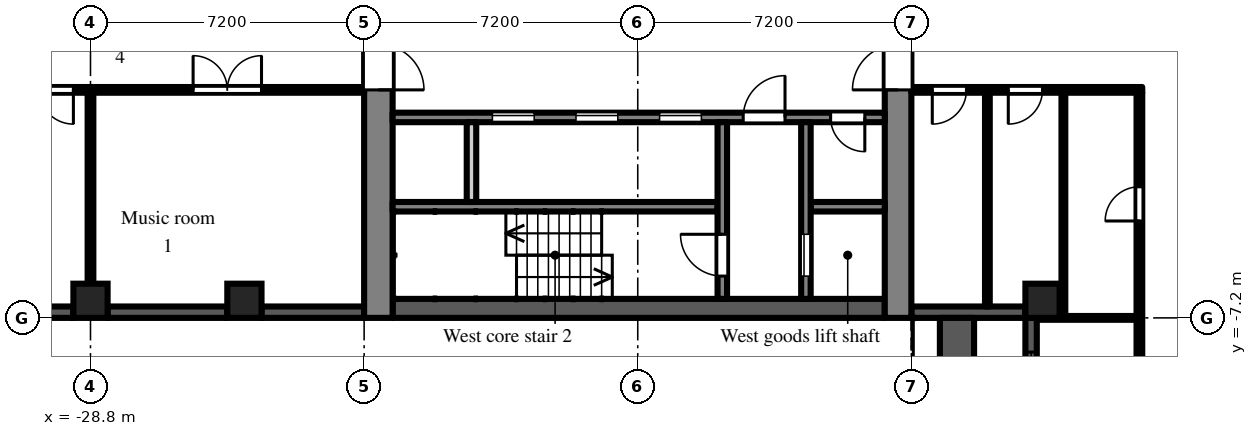
"""IFC4 building model, lengths in metres.
Left out: names, types, materials, properties, quantities, classifications, styles, units other than length and angle.
Written with IfcOpenShell. Run it as: python <this file> out.ifc"""

import sys

from ifc_helpers import new_model, si_unit, direction, frame, frame_2d, origin, origin_2d, place, context, subcontext, project, spatial, rectangle, extrude, element, fill, save


model = new_model("IFC4")
c1 = context("Model", 3, precision=1e-05, world=origin(), true_north=direction((0.0, 1.0)))
c2 = subcontext(c1, "Body", "Model", "MODEL_VIEW")
j1 = project(units=[si_unit("LENGTHUNIT", "METRE"), si_unit("PLANEANGLEUNIT", "RADIAN")], contexts=[c1])
p1 = place(None, origin())
s1 = spatial("IfcSite", under=j1, at=p1, CompositionType="ELEMENT")
p2 = place(p1, origin())
s2 = spatial("IfcBuilding", under=s1, at=p2, CompositionType="ELEMENT")
p3 = place(p2, frame((0.0, 0.0, 102.9)))
s3 = spatial("IfcBuildingStorey", under=s2, at=p3, CompositionType="ELEMENT", Elevation=102.9)
for number, where, z_axis, x_axis in (
    (1, (-28.8, -6.75, 0.0), (0.0, 0.0, 1.0), (1.0, 0.0, 0.0)),
    (2, (-24.75, -6.75, 0.0), (0.0, 0.0, 1.0), (1.0, 0.0, 0.0)),
    (3, (-3.75, -6.75, 0.0), (0.0, 0.0, 1.0), (1.0, 0.0, 0.0)),
):
    element("IfcColumn", number, at=place(p3, frame(where, z_axis=z_axis, x_axis=x_axis)), inside=s3, PredefinedType="COLUMN", context=c2, shape_type="SweptSolid", body=[
        extrude(rectangle(XDim=0.9, YDim=0.9, at=origin_2d()), origin(), (0.0, 0.0, 1.0), 3.0),
    ])
p4 = place(p3, frame((-35.55, -7.05, 0.0), z_axis=(0.0, 0.0, 1.0), x_axis=(1.0, 0.0, 0.0)))
e4 = element("IfcWall", 4, at=p4, inside=s3, PredefinedType="SOLIDWALL", context=c2, shape_type="SweptSolid", body=[
    extrude(rectangle(XDim=6.3, YDim=0.3, at=frame_2d((3.15, 0.0))), origin(), (0.0, 0.0, 1.0), 2.1),
])
p5 = place(p3, frame((-28.35, -7.05, 0.0), z_axis=(0.0, 0.0, 1.0), x_axis=(1.0, 0.0, 0.0)))
e5 = element("IfcWall", 5, at=p5, inside=s3, PredefinedType="SOLIDWALL", context=c2, shape_type="SweptSolid", body=[
    extrude(rectangle(XDim=3.15, YDim=0.3, at=frame_2d((1.575, 0.0))), origin(), (0.0, 0.0, 1.0), 2.1),
])
p6 = place(p3, frame((-24.3, -7.05, 0.0), z_axis=(0.0, 0.0, 1.0), x_axis=(1.0, 0.0, 0.0)))
e6 = element("IfcWall", 6, at=p6, inside=s3, PredefinedType="SOLIDWALL", context=c2, shape_type="SweptSolid", body=[
    extrude(rectangle(XDim=2.7, YDim=0.3, at=frame_2d((1.35, 0.0))), origin(), (0.0, 0.0, 1.0), 2.1),
])
p7 = place(p3, frame((-7.2, -7.05, 0.0), z_axis=(0.0, 0.0, 1.0), x_axis=(1.0, 0.0, 0.0)))
e7 = element("IfcWall", 7, at=p7, inside=s3, PredefinedType="SOLIDWALL", context=c2, shape_type="SweptSolid", body=[
    extrude(rectangle(XDim=3.0, YDim=0.3, at=frame_2d((1.5, 0.0))), origin(), (0.0, 0.0, 1.0), 2.1),
])
p8 = place(p3, frame((-4.05, -7.2, 0.0), z_axis=(0.0, 0.0, 1.0), x_axis=(0.0, -1.0, 0.0)))
e8 = element("IfcWall", 8, at=p8, inside=s3, PredefinedType="SOLIDWALL", context=c2, shape_type="SweptSolid", body=[
    extrude(rectangle(XDim=7.2, YDim=0.3, at=frame_2d((3.6, 0.0))), origin(), (0.0, 0.0, 1.0), 2.1),
])
p9 = place(p8, frame((3.0, 0.0, 0.0)))
e9 = element("IfcOpeningElement", 9, at=p9, cuts=e8, PredefinedType="OPENING", context=c2, shape_type="SweptSolid", body=[
    extrude(rectangle(XDim=1.2, YDim=2.05, at=frame_2d((0.6, 1.025))), frame((0.0, 0.16, 0.0), z_axis=(0.0, -1.0, 0.0), x_axis=(1.0, 0.0, 0.0)), (0.0, 0.0, 1.0), 0.32),
])
p10 = place(p8, frame((0.9, 0.0, 0.2)))
e10 = element("IfcOpeningElement", 10, at=p10, cuts=e8, PredefinedType="OPENING", context=c2, shape_type="SweptSolid", body=[
    extrude(rectangle(XDim=1.8, YDim=1.85, at=frame_2d((0.9, 0.925))), frame((0.0, 0.16, 0.0), z_axis=(0.0, -1.0, 0.0), x_axis=(1.0, 0.0, 0.0)), (0.0, 0.0, 1.0), 0.32),
])
p11 = place(p8, frame((4.5, 0.0, 0.2)))
e11 = element("IfcOpeningElement", 11, at=p11, cuts=e8, PredefinedType="OPENING", context=c2, shape_type="SweptSolid", body=[
    extrude(rectangle(XDim=1.8, YDim=1.85, at=frame_2d((0.9, 0.925))), frame((0.0, 0.16, 0.0), z_axis=(0.0, -1.0, 0.0), x_axis=(1.0, 0.0, 0.0)), (0.0, 0.0, 1.0), 0.32),
])
p12 = place(p3, frame((-6.0, -14.4, 0.0), z_axis=(0.0, 0.0, 1.0), x_axis=(0.0, 1.0, 0.0)))
e12 = element("IfcWall", 12, at=p12, inside=s3, PredefinedType="PARAPET", context=c2, shape_type="SweptSolid", body=[
    extrude(rectangle(XDim=7.2, YDim=0.9, at=frame_2d((3.6, 0.0))), origin(), (0.0, 0.0, 1.0), 0.8),
])
p13 = place(p3, frame((-7.55, -7.2, 0.0), z_axis=(0.0, 0.0, 1.0), x_axis=(0.0, 1.0, 0.0)))
e13 = element("IfcWall", 13, at=p13, inside=s3, PredefinedType="SHEAR", context=c2, shape_type="SweptSolid", body=[
    extrude(rectangle(XDim=14.4, YDim=0.7, at=frame_2d((7.2, 0.0))), origin(), (0.0, 0.0, 1.0), 2.575),
])
p14 = place(p13, frame((6.0, 0.0, 0.0)))
e14 = element("IfcOpeningElement", 14, at=p14, cuts=e13, PredefinedType="OPENING", context=c2, shape_type="SweptSolid", body=[
    extrude(rectangle(XDim=2.4, YDim=2.2, at=frame_2d((1.2, 1.1))), frame((0.0, 0.36, 0.0), z_axis=(0.0, -1.0, 0.0), x_axis=(1.0, 0.0, 0.0)), (0.0, 0.0, 1.0), 0.72),
])
p15 = place(p3, frame((-21.225, -7.2, 0.0), z_axis=(0.0, 0.0, 1.0), x_axis=(0.0, 1.0, 0.0)))
e15 = element("IfcWall", 15, at=p15, inside=s3, PredefinedType="SHEAR", context=c2, shape_type="SweptSolid", body=[
    extrude(rectangle(XDim=14.4, YDim=0.75, at=frame_2d((7.2, 0.0))), origin(), (0.0, 0.0, 1.0), 2.575),
])
p16 = place(p15, frame((6.0, 0.0, 0.0)))
e16 = element("IfcOpeningElement", 16, at=p16, cuts=e15, PredefinedType="OPENING", context=c2, shape_type="SweptSolid", body=[
    extrude(rectangle(XDim=2.4, YDim=2.2, at=frame_2d((1.2, 1.1))), frame((0.0, 0.385, 0.0), z_axis=(0.0, -1.0, 0.0), x_axis=(1.0, 0.0, 0.0)), (0.0, 0.0, 1.0), 0.77),
])
p17 = place(p3, frame((-7.9, -6.95, 0.0), z_axis=(0.0, 0.0, 1.0), x_axis=(-1.0, 0.0, 0.0)))
e17 = element("IfcWall", 17, at=p17, inside=s3, PredefinedType="SHEAR", context=c2, shape_type="SweptSolid", body=[
    extrude(rectangle(XDim=12.95, YDim=0.5, at=frame_2d((6.475, 0.0))), origin(), (0.0, 0.0, 1.0), 2.575),
])
p18 = place(p3, frame((-7.9, -1.925, 0.0), z_axis=(0.0, 0.0, 1.0), x_axis=(-1.0, 0.0, 0.0)))
e18 = element("IfcWall", 18, at=p18, inside=s3, PredefinedType="SHEAR", context=c2, shape_type="SweptSolid", body=[
    extrude(rectangle(XDim=12.95, YDim=0.25, at=frame_2d((6.475, 0.0))), origin(), (0.0, 0.0, 1.0), 2.575),
])
p19 = place(p18, frame((4.825, 0.0, 0.0)))
e19 = element("IfcOpeningElement", 19, at=p19, cuts=e18, PredefinedType="OPENING", context=c2, shape_type="SweptSolid", body=[
    extrude(rectangle(XDim=1.1, YDim=2.1, at=frame_2d((0.55, 1.05))), frame((0.0, 0.135, 0.0), z_axis=(0.0, -1.0, 0.0), x_axis=(1.0, 0.0, 0.0)), (0.0, 0.0, 1.0), 0.27),
])
p20 = place(p18, frame((7.025, 0.0, 0.0)))
e20 = element("IfcOpeningElement", 20, at=p20, cuts=e18, PredefinedType="OPENING", context=c2, shape_type="SweptSolid", body=[
    extrude(rectangle(XDim=1.1, YDim=2.1, at=frame_2d((0.55, 1.05))), frame((0.0, 0.135, 0.0), z_axis=(0.0, -1.0, 0.0), x_axis=(1.0, 0.0, 0.0)), (0.0, 0.0, 1.0), 0.27),
])
p21 = place(p18, frame((9.225, 0.0, 0.0)))
e21 = element("IfcOpeningElement", 21, at=p21, cuts=e18, PredefinedType="OPENING", context=c2, shape_type="SweptSolid", body=[
    extrude(rectangle(XDim=1.1, YDim=2.1, at=frame_2d((0.55, 1.05))), frame((0.0, 0.135, 0.0), z_axis=(0.0, -1.0, 0.0), x_axis=(1.0, 0.0, 0.0)), (0.0, 0.0, 1.0), 0.27),
])
p22 = place(p18, frame((0.525, 0.0, 0.0)))
e22 = element("IfcOpeningElement", 22, at=p22, cuts=e18, PredefinedType="OPENING", context=c2, shape_type="SweptSolid", body=[
    extrude(rectangle(XDim=0.9, YDim=2.1, at=frame_2d((0.45, 1.05))), frame((0.0, 0.135, 0.0), z_axis=(0.0, -1.0, 0.0), x_axis=(1.0, 0.0, 0.0)), (0.0, 0.0, 1.0), 0.27),
])
p23 = place(p18, frame((2.625, 0.0, 0.0)))
e23 = element("IfcOpeningElement", 23, at=p23, cuts=e18, PredefinedType="OPENING", context=c2, shape_type="SweptSolid", body=[
    extrude(rectangle(XDim=1.1, YDim=2.1, at=frame_2d((0.55, 1.05))), frame((0.0, 0.135, 0.0), z_axis=(0.0, -1.0, 0.0), x_axis=(1.0, 0.0, 0.0)), (0.0, 0.0, 1.0), 0.27),
])
p24 = place(p3, frame((-7.9, -4.275, 0.0), z_axis=(0.0, 0.0, 1.0), x_axis=(-1.0, 0.0, 0.0)))
e24 = element("IfcWall", 24, at=p24, inside=s3, PredefinedType="SHEAR", context=c2, shape_type="SweptSolid", body=[
    extrude(rectangle(XDim=1.95, YDim=0.25, at=frame_2d((0.975, 0.0))), origin(), (0.0, 0.0, 1.0), 2.575),
])
p25 = place(p3, frame((-12.3, -4.275, 0.0), z_axis=(0.0, 0.0, 1.0), x_axis=(-1.0, 0.0, 0.0)))
e25 = element("IfcWall", 25, at=p25, inside=s3, PredefinedType="SHEAR", context=c2, shape_type="SweptSolid", body=[
    extrude(rectangle(XDim=8.55, YDim=0.25, at=frame_2d((4.275, 0.0))), origin(), (0.0, 0.0, 1.0), 2.575),
])
p26 = place(p3, frame((-9.975, -2.05, 0.0), z_axis=(0.0, 0.0, 1.0), x_axis=(0.0, -1.0, 0.0)))
e26 = element("IfcWall", 26, at=p26, inside=s3, PredefinedType="SHEAR", context=c2, shape_type="SweptSolid", body=[
    extrude(rectangle(XDim=4.65, YDim=0.25, at=frame_2d((2.325, 0.0))), origin(), (0.0, 0.0, 1.0), 2.575),
])
p27 = place(p26, frame((2.95, 0.0, 0.0)))
e27 = element("IfcOpeningElement", 27, at=p27, cuts=e26, PredefinedType="OPENING", context=c2, shape_type="SweptSolid", body=[
    extrude(rectangle(XDim=1.1, YDim=2.1, at=frame_2d((0.55, 1.05))), frame((0.0, 0.135, 0.0), z_axis=(0.0, -1.0, 0.0), x_axis=(1.0, 0.0, 0.0)), (0.0, 0.0, 1.0), 0.27),
])
p28 = place(p3, frame((-12.175, -2.05, 0.0), z_axis=(0.0, 0.0, 1.0), x_axis=(0.0, -1.0, 0.0)))
e28 = element("IfcWall", 28, at=p28, inside=s3, PredefinedType="SHEAR", context=c2, shape_type="SweptSolid", body=[
    extrude(rectangle(XDim=4.65, YDim=0.25, at=frame_2d((2.325, 0.0))), origin(), (0.0, 0.0, 1.0), 2.575),
])
p29 = place(p28, frame((2.95, 0.0, 0.0)))
e29 = element("IfcOpeningElement", 29, at=p29, cuts=e28, PredefinedType="OPENING", context=c2, shape_type="SweptSolid", body=[
    extrude(rectangle(XDim=1.1, YDim=2.1, at=frame_2d((0.55, 1.05))), frame((0.0, 0.135, 0.0), z_axis=(0.0, -1.0, 0.0), x_axis=(1.0, 0.0, 0.0)), (0.0, 0.0, 1.0), 0.27),
])
p30 = place(p3, frame((-18.775, -2.05, 0.0), z_axis=(0.0, 0.0, 1.0), x_axis=(0.0, -1.0, 0.0)))
e30 = element("IfcWall", 30, at=p30, inside=s3, PredefinedType="PARTITIONING", context=c2, shape_type="SweptSolid", body=[
    extrude(rectangle(XDim=2.1, YDim=0.25, at=frame_2d((1.05, 0.0))), origin(), (0.0, 0.0, 1.0), 2.575),
])
p31 = place(p3, frame((-36.5, -1.2, 0.0), z_axis=(0.0, 0.0, 1.0), x_axis=(1.0, 0.0, 0.0)))
e31 = element("IfcWall", 31, at=p31, inside=s3, PredefinedType="PARTITIONING", context=c2, shape_type="SweptSolid", body=[
    extrude(rectangle(XDim=14.9, YDim=0.15, at=frame_2d((7.45, 0.0))), origin(), (0.0, 0.0, 1.0), 2.575),
])
p32 = place(p31, frame((10.4, 0.0, 0.0)))
e32 = element("IfcOpeningElement", 32, at=p32, cuts=e31, PredefinedType="OPENING", context=c2, shape_type="SweptSolid", body=[
    extrude(rectangle(XDim=1.8, YDim=2.1, at=frame_2d((0.9, 1.05))), frame((0.0, 0.085, 0.0), z_axis=(0.0, -1.0, 0.0), x_axis=(1.0, 0.0, 0.0)), (0.0, 0.0, 1.0), 0.17),
])
p33 = place(p31, frame((6.35, 0.0, 0.0)))
e33 = element("IfcOpeningElement", 33, at=p33, cuts=e31, PredefinedType="OPENING", context=c2, shape_type="SweptSolid", body=[
    extrude(rectangle(XDim=0.9, YDim=2.1, at=frame_2d((0.45, 1.05))), frame((0.0, 0.085, 0.0), z_axis=(0.0, -1.0, 0.0), x_axis=(1.0, 0.0, 0.0)), (0.0, 0.0, 1.0), 0.17),
])
p34 = place(p31, frame((4.55, 0.0, 0.0)))
e34 = element("IfcOpeningElement", 34, at=p34, cuts=e31, PredefinedType="OPENING", context=c2, shape_type="SweptSolid", body=[
    extrude(rectangle(XDim=0.9, YDim=2.1, at=frame_2d((0.45, 1.05))), frame((0.0, 0.085, 0.0), z_axis=(0.0, -1.0, 0.0), x_axis=(1.0, 0.0, 0.0)), (0.0, 0.0, 1.0), 0.17),
])
p35 = place(p31, frame((1.15, 0.0, 0.0)))
e35 = element("IfcOpeningElement", 35, at=p35, cuts=e31, PredefinedType="OPENING", context=c2, shape_type="SweptSolid", body=[
    extrude(rectangle(XDim=1.8, YDim=2.1, at=frame_2d((0.9, 1.05))), frame((0.0, 0.085, 0.0), z_axis=(0.0, -1.0, 0.0), x_axis=(1.0, 0.0, 0.0)), (0.0, 0.0, 1.0), 0.17),
])
p36 = place(p3, frame((-28.8, -6.9, 0.0), z_axis=(0.0, 0.0, 1.0), x_axis=(0.0, 1.0, 0.0)))
e36 = element("IfcWall", 36, at=p36, inside=s3, PredefinedType="PARTITIONING", context=c2, shape_type="SweptSolid", body=[
    extrude(rectangle(XDim=5.625, YDim=0.15, at=frame_2d((2.812, 0.0))), origin(), (0.0, 0.0, 1.0), 2.575),
])
p37 = place(p3, frame((-7.2, -1.2, 0.0), z_axis=(0.0, 0.0, 1.0), x_axis=(1.0, 0.0, 0.0)))
e37 = element("IfcWall", 37, at=p37, inside=s3, PredefinedType="PARTITIONING", context=c2, shape_type="SweptSolid", body=[
    extrude(rectangle(XDim=6.075, YDim=0.15, at=frame_2d((3.038, 0.0))), origin(), (0.0, 0.0, 1.0), 2.575),
])
p38 = place(p37, frame((2.55, 0.0, 0.0)))
e38 = element("IfcOpeningElement", 38, at=p38, cuts=e37, PredefinedType="OPENING", context=c2, shape_type="SweptSolid", body=[
    extrude(rectangle(XDim=0.9, YDim=2.1, at=frame_2d((0.45, 1.05))), frame((0.0, 0.085, 0.0), z_axis=(0.0, -1.0, 0.0), x_axis=(1.0, 0.0, 0.0)), (0.0, 0.0, 1.0), 0.17),
])
p39 = place(p37, frame((0.55, 0.0, 0.0)))
e39 = element("IfcOpeningElement", 39, at=p39, cuts=e37, PredefinedType="OPENING", context=c2, shape_type="SweptSolid", body=[
    extrude(rectangle(XDim=0.9, YDim=2.1, at=frame_2d((0.45, 1.05))), frame((0.0, 0.085, 0.0), z_axis=(0.0, -1.0, 0.0), x_axis=(1.0, 0.0, 0.0)), (0.0, 0.0, 1.0), 0.17),
])
p40 = place(p3, frame((-5.2, -6.9, 0.0), z_axis=(0.0, 0.0, 1.0), x_axis=(0.0, 1.0, 0.0)))
e40 = element("IfcWall", 40, at=p40, inside=s3, PredefinedType="PARTITIONING", context=c2, shape_type="SweptSolid", body=[
    extrude(rectangle(XDim=5.625, YDim=0.125, at=frame_2d((2.812, 0.0))), origin(), (0.0, 0.0, 1.0), 2.575),
])
p41 = place(p3, frame((-3.9, -7.2, 0.0), z_axis=(0.0, 0.0, 1.0), x_axis=(1.0, 0.0, 0.0)))
e41 = element("IfcWall", 41, at=p41, inside=s3, PredefinedType="PARTITIONING", context=c2, shape_type="SweptSolid", body=[
    extrude(rectangle(XDim=2.625, YDim=0.1, at=frame_2d((1.312, 0.0))), origin(), (0.0, 0.0, 1.0), 2.575),
])
p42 = place(p3, frame((-3.2, -7.15, 0.0), z_axis=(0.0, 0.0, 1.0), x_axis=(0.0, 1.0, 0.0)))
e42 = element("IfcWall", 42, at=p42, inside=s3, PredefinedType="PARTITIONING", context=c2, shape_type="SweptSolid", body=[
    extrude(rectangle(XDim=5.875, YDim=0.1, at=frame_2d((2.938, 0.0))), origin(), (0.0, 0.0, 1.0), 2.575),
])
p43 = place(p3, frame((-1.2, -36.5, 0.0), z_axis=(0.0, 0.0, 1.0), x_axis=(0.0, 1.0, 0.0)))
e43 = element("IfcWall", 43, at=p43, inside=s3, PredefinedType="PARTITIONING", context=c2, shape_type="SweptSolid", body=[
    extrude(rectangle(XDim=35.225, YDim=0.15, at=frame_2d((17.613, 0.0))), origin(), (0.0, 0.0, 1.0), 2.575),
])
p44 = place(p43, frame((31.85, 0.0, 0.0)))
e44 = element("IfcOpeningElement", 44, at=p44, cuts=e43, PredefinedType="OPENING", context=c2, shape_type="SweptSolid", body=[
    extrude(rectangle(XDim=0.9, YDim=2.1, at=frame_2d((0.45, 1.05))), frame((0.0, 0.085, 0.0), z_axis=(0.0, -1.0, 0.0), x_axis=(1.0, 0.0, 0.0)), (0.0, 0.0, 1.0), 0.17),
])
p45 = place(p43, frame((27.05, 0.0, 0.0)))
e45 = element("IfcOpeningElement", 45, at=p45, cuts=e43, PredefinedType="OPENING", context=c2, shape_type="SweptSolid", body=[
    extrude(rectangle(XDim=0.9, YDim=2.1, at=frame_2d((0.45, 1.05))), frame((0.0, 0.085, 0.0), z_axis=(0.0, -1.0, 0.0), x_axis=(1.0, 0.0, 0.0)), (0.0, 0.0, 1.0), 0.17),
])
p46 = place(p43, frame((20.75, 0.0, 0.0)))
e46 = element("IfcOpeningElement", 46, at=p46, cuts=e43, PredefinedType="OPENING", context=c2, shape_type="SweptSolid", body=[
    extrude(rectangle(XDim=0.9, YDim=2.1, at=frame_2d((0.45, 1.05))), frame((0.0, 0.085, 0.0), z_axis=(0.0, -1.0, 0.0), x_axis=(1.0, 0.0, 0.0)), (0.0, 0.0, 1.0), 0.17),
])
p47 = place(p43, frame((18.95, 0.0, 0.0)))
e47 = element("IfcOpeningElement", 47, at=p47, cuts=e43, PredefinedType="OPENING", context=c2, shape_type="SweptSolid", body=[
    extrude(rectangle(XDim=0.9, YDim=2.1, at=frame_2d((0.45, 1.05))), frame((0.0, 0.085, 0.0), z_axis=(0.0, -1.0, 0.0), x_axis=(1.0, 0.0, 0.0)), (0.0, 0.0, 1.0), 0.17),
])
p48 = place(p43, frame((1.55, 0.0, 0.0)))
e48 = element("IfcOpeningElement", 48, at=p48, cuts=e43, PredefinedType="OPENING", context=c2, shape_type="SweptSolid", body=[
    extrude(rectangle(XDim=1.0, YDim=2.1, at=frame_2d((0.5, 1.05))), frame((0.0, 0.085, 0.0), z_axis=(0.0, -1.0, 0.0), x_axis=(1.0, 0.0, 0.0)), (0.0, 0.0, 1.0), 0.17),
])
p49 = place(p10, origin())
e49 = element("IfcWindow", 49, at=p49, inside=s3, PartitioningType="SINGLE_PANEL", PredefinedType="WINDOW", context=c2, shape_type="SweptSolid", body=[
    extrude(rectangle(XDim=1.8, YDim=1.85, at=frame_2d((0.9, 0.925))), frame((0.0, 0.03, 0.0), z_axis=(0.0, -1.0, 0.0), x_axis=(1.0, 0.0, 0.0)), (0.0, 0.0, 1.0), 0.06),
])
fill(e10, e49)
p50 = place(p19, origin())
e50 = element("IfcDoor", 50, at=p50, inside=s3, OperationType="SLIDING_TO_LEFT", PredefinedType="DOOR", context=c2, shape_type="SweptSolid", body=[
    extrude(rectangle(XDim=1.1, YDim=2.1, at=frame_2d((0.55, 1.05))), frame((0.0, 0.025, 0.0), z_axis=(0.0, -1.0, 0.0), x_axis=(1.0, 0.0, 0.0)), (0.0, 0.0, 1.0), 0.05),
])
fill(e19, e50)
p51 = place(p20, origin())
e51 = element("IfcDoor", 51, at=p51, inside=s3, OperationType="SLIDING_TO_LEFT", PredefinedType="DOOR", context=c2, shape_type="SweptSolid", body=[
    extrude(rectangle(XDim=1.1, YDim=2.1, at=frame_2d((0.55, 1.05))), frame((0.0, 0.025, 0.0), z_axis=(0.0, -1.0, 0.0), x_axis=(1.0, 0.0, 0.0)), (0.0, 0.0, 1.0), 0.05),
])
fill(e20, e51)
p52 = place(p21, origin())
e52 = element("IfcDoor", 52, at=p52, inside=s3, OperationType="SLIDING_TO_LEFT", PredefinedType="DOOR", context=c2, shape_type="SweptSolid", body=[
    extrude(rectangle(XDim=1.1, YDim=2.1, at=frame_2d((0.55, 1.05))), frame((0.0, 0.025, 0.0), z_axis=(0.0, -1.0, 0.0), x_axis=(1.0, 0.0, 0.0)), (0.0, 0.0, 1.0), 0.05),
])
fill(e21, e52)
p53 = place(p27, origin())
e53 = element("IfcDoor", 53, at=p53, inside=s3, OperationType="SLIDING_TO_LEFT", PredefinedType="DOOR", context=c2, shape_type="SweptSolid", body=[
    extrude(rectangle(XDim=1.1, YDim=2.1, at=frame_2d((0.55, 1.05))), frame((0.0, 0.025, 0.0), z_axis=(0.0, -1.0, 0.0), x_axis=(1.0, 0.0, 0.0)), (0.0, 0.0, 1.0), 0.05),
])
fill(e27, e53)
p54 = place(p29, frame((1.1, 0.0, 0.0), z_axis=(0.0, 0.0, 1.0), x_axis=(-1.0, 0.0, 0.0)))
e54 = element("IfcDoor", 54, at=p54, inside=s3, OperationType="SINGLE_SWING_RIGHT", PredefinedType="DOOR", context=c2, shape_type="SweptSolid", body=[
    extrude(rectangle(XDim=1.1, YDim=2.1, at=frame_2d((0.55, 1.05))), frame((0.0, 0.025, 0.0), z_axis=(0.0, -1.0, 0.0), x_axis=(1.0, 0.0, 0.0)), (0.0, 0.0, 1.0), 0.05),
])
fill(e29, e54)
p55 = place(p22, origin())
e55 = element("IfcDoor", 55, at=p55, inside=s3, OperationType="SINGLE_SWING_LEFT", PredefinedType="DOOR", context=c2, shape_type="SweptSolid", body=[
    extrude(rectangle(XDim=0.9, YDim=2.1, at=frame_2d((0.45, 1.05))), frame((0.0, 0.025, 0.0), z_axis=(0.0, -1.0, 0.0), x_axis=(1.0, 0.0, 0.0)), (0.0, 0.0, 1.0), 0.05),
])
fill(e22, e55)
p56 = place(p23, frame((1.1, 0.0, 0.0), z_axis=(0.0, 0.0, 1.0), x_axis=(-1.0, 0.0, 0.0)))
e56 = element("IfcDoor", 56, at=p56, inside=s3, OperationType="SINGLE_SWING_RIGHT", PredefinedType="DOOR", context=c2, shape_type="SweptSolid", body=[
    extrude(rectangle(XDim=1.1, YDim=2.1, at=frame_2d((0.55, 1.05))), frame((0.0, 0.025, 0.0), z_axis=(0.0, -1.0, 0.0), x_axis=(1.0, 0.0, 0.0)), (0.0, 0.0, 1.0), 0.05),
])
fill(e23, e56)
p57 = place(p14, origin())
e57 = element("IfcDoor", 57, at=p57, inside=s3, OperationType="DOUBLE_DOOR_DOUBLE_SWING", PredefinedType="DOOR", context=c2, shape_type="SweptSolid", body=[
    extrude(rectangle(XDim=2.4, YDim=2.2, at=frame_2d((1.2, 1.1))), frame((0.0, 0.025, 0.0), z_axis=(0.0, -1.0, 0.0), x_axis=(1.0, 0.0, 0.0)), (0.0, 0.0, 1.0), 0.05),
])
fill(e14, e57)
p58 = place(p16, frame((2.4, 0.0, 0.0), z_axis=(0.0, 0.0, 1.0), x_axis=(-1.0, 0.0, 0.0)))
e58 = element("IfcDoor", 58, at=p58, inside=s3, OperationType="DOUBLE_DOOR_DOUBLE_SWING", PredefinedType="DOOR", context=c2, shape_type="SweptSolid", body=[
    extrude(rectangle(XDim=2.4, YDim=2.2, at=frame_2d((1.2, 1.1))), frame((0.0, 0.025, 0.0), z_axis=(0.0, -1.0, 0.0), x_axis=(1.0, 0.0, 0.0)), (0.0, 0.0, 1.0), 0.05),
])
fill(e16, e58)
p59 = place(p44, origin())
e59 = element("IfcDoor", 59, at=p59, inside=s3, OperationType="SINGLE_SWING_LEFT", PredefinedType="DOOR", context=c2, shape_type="SweptSolid", body=[
    extrude(rectangle(XDim=0.9, YDim=2.1, at=frame_2d((0.45, 1.05))), frame((0.0, 0.025, 0.0), z_axis=(0.0, -1.0, 0.0), x_axis=(1.0, 0.0, 0.0)), (0.0, 0.0, 1.0), 0.05),
])
fill(e44, e59)
p60 = place(p38, frame((0.9, 0.0, 0.0), z_axis=(0.0, 0.0, 1.0), x_axis=(-1.0, 0.0, 0.0)))
e60 = element("IfcDoor", 60, at=p60, inside=s3, OperationType="SINGLE_SWING_RIGHT", PredefinedType="DOOR", context=c2, shape_type="SweptSolid", body=[
    extrude(rectangle(XDim=0.9, YDim=2.1, at=frame_2d((0.45, 1.05))), frame((0.0, 0.025, 0.0), z_axis=(0.0, -1.0, 0.0), x_axis=(1.0, 0.0, 0.0)), (0.0, 0.0, 1.0), 0.05),
])
fill(e38, e60)
p61 = place(p39, frame((0.9, 0.0, 0.0), z_axis=(0.0, 0.0, 1.0), x_axis=(-1.0, 0.0, 0.0)))
e61 = element("IfcDoor", 61, at=p61, inside=s3, OperationType="SINGLE_SWING_RIGHT", PredefinedType="DOOR", context=c2, shape_type="SweptSolid", body=[
    extrude(rectangle(XDim=0.9, YDim=2.1, at=frame_2d((0.45, 1.05))), frame((0.0, 0.025, 0.0), z_axis=(0.0, -1.0, 0.0), x_axis=(1.0, 0.0, 0.0)), (0.0, 0.0, 1.0), 0.05),
])
fill(e39, e61)
p62 = place(p32, origin())
e62 = element("IfcDoor", 62, at=p62, inside=s3, OperationType="DOUBLE_DOOR_DOUBLE_SWING", PredefinedType="DOOR", context=c2, shape_type="SweptSolid", body=[
    extrude(rectangle(XDim=1.8, YDim=2.1, at=frame_2d((0.9, 1.05))), frame((0.0, 0.025, 0.0), z_axis=(0.0, -1.0, 0.0), x_axis=(1.0, 0.0, 0.0)), (0.0, 0.0, 1.0), 0.05),
])
fill(e32, e62)
p63 = place(p33, frame((0.9, 0.0, 0.0), z_axis=(0.0, 0.0, 1.0), x_axis=(-1.0, 0.0, 0.0)))
e63 = element("IfcDoor", 63, at=p63, inside=s3, OperationType="SINGLE_SWING_LEFT", PredefinedType="DOOR", context=c2, shape_type="SweptSolid", body=[
    extrude(rectangle(XDim=0.9, YDim=2.1, at=frame_2d((0.45, 1.05))), frame((0.0, 0.025, 0.0), z_axis=(0.0, -1.0, 0.0), x_axis=(1.0, 0.0, 0.0)), (0.0, 0.0, 1.0), 0.05),
])
fill(e33, e63)
save(model, sys.argv[1])
